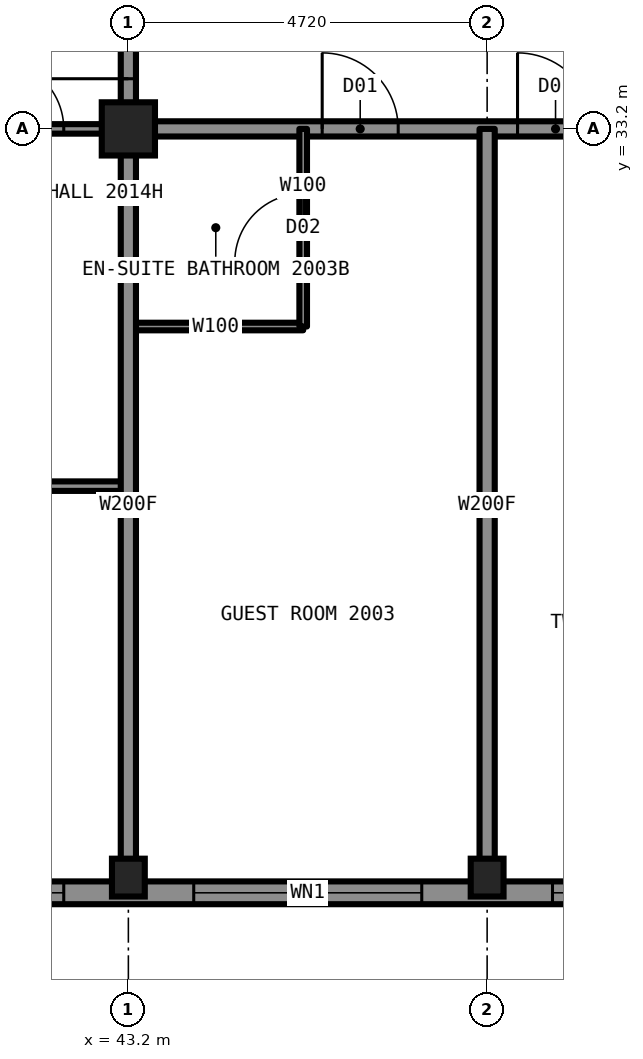
"""IFC4 building model, lengths in metres.
Left out: names, types, materials, properties, quantities, classifications, styles, units other than length and angle.
Written with IfcOpenShell. Run it as: python <this file> out.ifc"""

import sys

from ifc_helpers import new_model, si_unit, direction, frame, frame_2d, origin, origin_2d, place, context, subcontext, project, spatial, rectangle, hollow_rectangle, i_section, extrude, element, fill, save


model = new_model("IFC4")
c1 = context("Model", 3, precision=1e-05, world=origin(), true_north=direction((0.0, 1.0)))
c2 = subcontext(c1, "Body", "Model", "MODEL_VIEW")
j1 = project(units=[si_unit("LENGTHUNIT", "METRE"), si_unit("PLANEANGLEUNIT", "RADIAN")], contexts=[c1])
p1 = place(None, origin())
s1 = spatial("IfcSite", under=j1, at=p1, CompositionType="ELEMENT")
p2 = place(p1, origin())
s2 = spatial("IfcBuilding", under=s1, at=p2, CompositionType="ELEMENT")
p3 = place(p2, frame((0.0, 0.0, 70.5)))
s3 = spatial("IfcBuildingStorey", under=s2, at=p3, CompositionType="ELEMENT", Elevation=70.5)
for number, where, z_axis, x_axis in (
    (1, (43.2, 23.35, 0.0), (0.0, 0.0, 1.0), (1.0, 0.0, 0.0)),
    (2, (47.92, 23.35, 0.0), (0.0, 0.0, 1.0), (1.0, 0.0, 0.0)),
):
    element("IfcColumn", number, at=place(p3, frame(where, z_axis=z_axis, x_axis=x_axis)), inside=s3, PredefinedType="COLUMN", context=c2, shape_type="SweptSolid", body=[
        extrude(i_section(OverallWidth=0.432, OverallDepth=0.498, WebThickness=0.056, FlangeThickness=0.089, at=origin_2d()), origin(), (0.0, 0.0, 1.0), 3.5),
    ])
p4 = place(p3, frame((43.2, 33.2, 0.0), z_axis=(0.0, 0.0, 1.0), x_axis=(1.0, 0.0, 0.0)))
e3 = element("IfcColumn", 3, at=p4, inside=s3, PredefinedType="COLUMN", context=c2, shape_type="SweptSolid", body=[
    extrude(hollow_rectangle(XDim=0.7, YDim=0.7, WallThickness=0.06, at=origin_2d()), origin(), (0.0, 0.0, 1.0), 3.5),
])
p5 = place(p3, frame((43.2, 33.2, 0.0), z_axis=(0.0, 0.0, 1.0), x_axis=(1.0, 0.0, 0.0)))
e4 = element("IfcWall", 4, at=p5, inside=s3, PredefinedType="PARTITIONING", context=c2, shape_type="SweptSolid", body=[
    extrude(rectangle(XDim=23.6, YDim=0.2, at=frame_2d((11.8, 0.0))), origin(), (0.0, 0.0, 1.0), 3.33),
])
p6 = place(p5, frame((2.55, 0.0, 0.0)))
e5 = element("IfcOpeningElement", 5, at=p6, cuts=e4, PredefinedType="OPENING", context=c2, shape_type="SweptSolid", body=[
    extrude(rectangle(XDim=1.0, YDim=2.2, at=frame_2d((0.5, 1.1))), frame((0.0, 0.11, 0.0), z_axis=(0.0, -1.0, 0.0), x_axis=(1.0, 0.0, 0.0)), (0.0, 0.0, 1.0), 0.22),
])
p7 = place(p5, frame((5.12, 0.0, 0.0)))
e6 = element("IfcOpeningElement", 6, at=p7, cuts=e4, PredefinedType="OPENING", context=c2, shape_type="SweptSolid", body=[
    extrude(rectangle(XDim=1.0, YDim=2.2, at=frame_2d((0.5, 1.1))), frame((0.0, 0.11, 0.0), z_axis=(0.0, -1.0, 0.0), x_axis=(1.0, 0.0, 0.0)), (0.0, 0.0, 1.0), 0.22),
])
p8 = place(p5, frame((11.7, 0.0, 0.0)))
e7 = element("IfcOpeningElement", 7, at=p8, cuts=e4, PredefinedType="OPENING", context=c2, shape_type="SweptSolid", body=[
    extrude(rectangle(XDim=1.0, YDim=2.2, at=frame_2d((0.5, 1.1))), frame((0.0, 0.11, 0.0), z_axis=(0.0, -1.0, 0.0), x_axis=(1.0, 0.0, 0.0)), (0.0, 0.0, 1.0), 0.22),
])
p9 = place(p5, frame((16.42, 0.0, 0.0)))
e8 = element("IfcOpeningElement", 8, at=p9, cuts=e4, PredefinedType="OPENING", context=c2, shape_type="SweptSolid", body=[
    extrude(rectangle(XDim=1.0, YDim=2.2, at=frame_2d((0.5, 1.1))), frame((0.0, 0.11, 0.0), z_axis=(0.0, -1.0, 0.0), x_axis=(1.0, 0.0, 0.0)), (0.0, 0.0, 1.0), 0.22),
])
p10 = place(p5, frame((21.43, 0.0, 0.0)))
e9 = element("IfcOpeningElement", 9, at=p10, cuts=e4, PredefinedType="OPENING", context=c2, shape_type="SweptSolid", body=[
    extrude(rectangle(XDim=1.0, YDim=2.2, at=frame_2d((0.5, 1.1))), frame((0.0, 0.11, 0.0), z_axis=(0.0, -1.0, 0.0), x_axis=(1.0, 0.0, 0.0)), (0.0, 0.0, 1.0), 0.22),
])
p11 = place(p3, frame((33.3, 33.2, 0.0), z_axis=(0.0, 0.0, 1.0), x_axis=(1.0, 0.0, 0.0)))
e10 = element("IfcWall", 10, at=p11, inside=s3, PredefinedType="PARTITIONING", context=c2, shape_type="SweptSolid", body=[
    extrude(rectangle(XDim=9.9, YDim=0.125, at=frame_2d((4.95, 0.0))), origin(), (0.0, 0.0, 1.0), 2.573),
])
p12 = place(p11, frame((8.15, 0.0, 0.0)))
e11 = element("IfcOpeningElement", 11, at=p12, cuts=e10, PredefinedType="OPENING", context=c2, shape_type="SweptSolid", body=[
    extrude(rectangle(XDim=0.9, YDim=2.2, at=frame_2d((0.45, 1.1))), frame((0.0, 0.073, 0.0), z_axis=(0.0, -1.0, 0.0), x_axis=(1.0, 0.0, 0.0)), (0.0, 0.0, 1.0), 0.145),
])
p13 = place(p3, frame((43.2, 30.6, 0.0), z_axis=(0.0, 0.0, 1.0), x_axis=(1.0, 0.0, 0.0)))
e12 = element("IfcWall", 12, at=p13, inside=s3, PredefinedType="PARTITIONING", context=c2, shape_type="SweptSolid", body=[
    extrude(rectangle(XDim=2.3, YDim=0.1, at=frame_2d((1.15, 0.0))), origin(), (0.0, 0.0, 1.0), 3.33),
])
p14 = place(p3, frame((33.306, 28.5, 0.0), z_axis=(0.0, 0.0, 1.0), x_axis=(1.0, 0.0, 0.0)))
e13 = element("IfcWall", 13, at=p14, inside=s3, PredefinedType="PARTITIONING", context=c2, shape_type="SweptSolid", body=[
    extrude(rectangle(XDim=9.894, YDim=0.125, at=frame_2d((4.947, 0.0))), origin(), (0.0, 0.0, 1.0), 3.33),
])
p15 = place(p14, frame((7.244, 0.0, 0.0)))
e14 = element("IfcOpeningElement", 14, at=p15, cuts=e13, PredefinedType="OPENING", context=c2, shape_type="SweptSolid", body=[
    extrude(rectangle(XDim=0.9, YDim=2.2, at=frame_2d((0.45, 1.1))), frame((0.0, 0.073, 0.0), z_axis=(0.0, -1.0, 0.0), x_axis=(1.0, 0.0, 0.0)), (0.0, 0.0, 1.0), 0.145),
])
p16 = place(p3, frame((43.2, 33.2, 0.0), z_axis=(0.0, 0.0, 1.0), x_axis=(0.0, 1.0, 0.0)))
e15 = element("IfcWall", 15, at=p16, inside=s3, PredefinedType="PARTITIONING", context=c2, shape_type="SweptSolid", body=[
    extrude(rectangle(XDim=23.6, YDim=0.2, at=frame_2d((11.8, 0.0))), origin(), (0.0, 0.0, 1.0), 3.33),
])
p17 = place(p16, frame((7.87, 0.0, 0.0)))
e16 = element("IfcOpeningElement", 16, at=p17, cuts=e15, PredefinedType="OPENING", context=c2, shape_type="SweptSolid", body=[
    extrude(rectangle(XDim=1.0, YDim=2.2, at=frame_2d((0.5, 1.1))), frame((0.0, 0.11, 0.0), z_axis=(0.0, -1.0, 0.0), x_axis=(1.0, 0.0, 0.0)), (0.0, 0.0, 1.0), 0.22),
])
p18 = place(p16, frame((12.44, 0.0, 0.0)))
e17 = element("IfcOpeningElement", 17, at=p18, cuts=e15, PredefinedType="OPENING", context=c2, shape_type="SweptSolid", body=[
    extrude(rectangle(XDim=1.0, YDim=2.2, at=frame_2d((0.5, 1.1))), frame((0.0, 0.11, 0.0), z_axis=(0.0, -1.0, 0.0), x_axis=(1.0, 0.0, 0.0)), (0.0, 0.0, 1.0), 0.22),
])
p19 = place(p16, frame((21.85, 0.0, 0.0)))
e18 = element("IfcOpeningElement", 18, at=p19, cuts=e15, PredefinedType="OPENING", context=c2, shape_type="SweptSolid", body=[
    extrude(rectangle(XDim=1.1, YDim=2.2, at=frame_2d((0.55, 1.1))), frame((0.0, 0.11, 0.0), z_axis=(0.0, -1.0, 0.0), x_axis=(1.0, 0.0, 0.0)), (0.0, 0.0, 1.0), 0.22),
])
p20 = place(p16, frame((0.66, 0.0, 0.0)))
e19 = element("IfcOpeningElement", 19, at=p20, cuts=e15, PredefinedType="OPENING", context=c2, shape_type="SweptSolid", body=[
    extrude(rectangle(XDim=1.1, YDim=2.2, at=frame_2d((0.55, 1.1))), frame((0.0, 0.11, 0.0), z_axis=(0.0, -1.0, 0.0), x_axis=(1.0, 0.0, 0.0)), (0.0, 0.0, 1.0), 0.22),
])
for number, where, z_axis, x_axis in (
    (20, (43.2, 23.3, 0.0), (0.0, 0.0, 1.0), (0.0, 1.0, 0.0)),
    (21, (47.92, 23.3, 0.0), (0.0, 0.0, 1.0), (0.0, 1.0, 0.0)),
):
    element("IfcWall", number, at=place(p3, frame(where, z_axis=z_axis, x_axis=x_axis)), inside=s3, PredefinedType="PARTITIONING", context=c2, shape_type="SweptSolid", body=[
        extrude(rectangle(XDim=9.9, YDim=0.2, at=frame_2d((4.95, 0.0))), origin(), (0.0, 0.0, 1.0), 2.573),
    ])
p21 = place(p3, frame((45.5, 30.6, 0.0), z_axis=(0.0, 0.0, 1.0), x_axis=(0.0, 1.0, 0.0)))
e22 = element("IfcWall", 22, at=p21, inside=s3, PredefinedType="PARTITIONING", context=c2, shape_type="SweptSolid", body=[
    extrude(rectangle(XDim=2.6, YDim=0.1, at=frame_2d((1.3, 0.0))), origin(), (0.0, 0.0, 1.0), 3.33),
])
p22 = place(p21, frame((0.85, 0.0, 0.0)))
e23 = element("IfcOpeningElement", 23, at=p22, cuts=e22, PredefinedType="OPENING", context=c2, shape_type="SweptSolid", body=[
    extrude(rectangle(XDim=0.9, YDim=2.1, at=frame_2d((0.45, 1.05))), frame((0.0, 0.06, 0.0), z_axis=(0.0, -1.0, 0.0), x_axis=(1.0, 0.0, 0.0)), (0.0, 0.0, 1.0), 0.12),
])
p23 = place(p3, frame((38.5, 23.15, 0.0), z_axis=(0.0, 0.0, 1.0), x_axis=(1.0, 0.0, 0.0)))
e24 = element("IfcWall", 24, at=p23, inside=s3, PredefinedType="SOLIDWALL", context=c2, shape_type="SweptSolid", body=[
    extrude(rectangle(XDim=33.0, YDim=0.3, at=frame_2d((16.5, 0.0))), origin(), (0.0, 0.0, 1.0), 2.83),
])
p24 = place(p23, frame((0.85, 0.0, 0.5)))
e25 = element("IfcOpeningElement", 25, at=p24, cuts=e24, PredefinedType="OPENING", context=c2, shape_type="SweptSolid", body=[
    extrude(rectangle(XDim=2.9, YDim=2.0, at=frame_2d((1.45, 1.0))), frame((0.0, 0.16, 0.0), z_axis=(0.0, -1.0, 0.0), x_axis=(1.0, 0.0, 0.0)), (0.0, 0.0, 1.0), 0.32),
])
p25 = place(p23, frame((6.96, 0.0, 0.55)))
e26 = element("IfcOpeningElement", 26, at=p25, cuts=e24, PredefinedType="OPENING", context=c2, shape_type="SweptSolid", body=[
    extrude(rectangle(XDim=1.6, YDim=1.9, at=frame_2d((0.8, 0.95))), frame((0.0, 0.16, 0.0), z_axis=(0.0, -1.0, 0.0), x_axis=(1.0, 0.0, 0.0)), (0.0, 0.0, 1.0), 0.32),
])
p26 = place(p23, frame((10.28, 0.0, 0.5)))
e27 = element("IfcOpeningElement", 27, at=p26, cuts=e24, PredefinedType="OPENING", context=c2, shape_type="SweptSolid", body=[
    extrude(rectangle(XDim=3.0, YDim=2.0, at=frame_2d((1.5, 1.0))), frame((0.0, 0.16, 0.0), z_axis=(0.0, -1.0, 0.0), x_axis=(1.0, 0.0, 0.0)), (0.0, 0.0, 1.0), 0.32),
])
p27 = place(p23, frame((15.0, 0.0, 0.5)))
e28 = element("IfcOpeningElement", 28, at=p27, cuts=e24, PredefinedType="OPENING", context=c2, shape_type="SweptSolid", body=[
    extrude(rectangle(XDim=3.0, YDim=2.0, at=frame_2d((1.5, 1.0))), frame((0.0, 0.16, 0.0), z_axis=(0.0, -1.0, 0.0), x_axis=(1.0, 0.0, 0.0)), (0.0, 0.0, 1.0), 0.32),
])
p28 = place(p23, frame((19.72, 0.0, 0.5)))
e29 = element("IfcOpeningElement", 29, at=p28, cuts=e24, PredefinedType="OPENING", context=c2, shape_type="SweptSolid", body=[
    extrude(rectangle(XDim=3.0, YDim=2.0, at=frame_2d((1.5, 1.0))), frame((0.0, 0.16, 0.0), z_axis=(0.0, -1.0, 0.0), x_axis=(1.0, 0.0, 0.0)), (0.0, 0.0, 1.0), 0.32),
])
p29 = place(p23, frame((24.44, 0.0, 0.55)))
e30 = element("IfcOpeningElement", 30, at=p29, cuts=e24, PredefinedType="OPENING", context=c2, shape_type="SweptSolid", body=[
    extrude(rectangle(XDim=1.6, YDim=1.9, at=frame_2d((0.8, 0.95))), frame((0.0, 0.16, 0.0), z_axis=(0.0, -1.0, 0.0), x_axis=(1.0, 0.0, 0.0)), (0.0, 0.0, 1.0), 0.32),
])
p30 = place(p23, frame((29.25, 0.0, 0.5)))
e31 = element("IfcOpeningElement", 31, at=p30, cuts=e24, PredefinedType="OPENING", context=c2, shape_type="SweptSolid", body=[
    extrude(rectangle(XDim=2.9, YDim=2.0, at=frame_2d((1.45, 1.0))), frame((0.0, 0.16, 0.0), z_axis=(0.0, -1.0, 0.0), x_axis=(1.0, 0.0, 0.0)), (0.0, 0.0, 1.0), 0.32),
])
p31 = place(p23, frame((6.31, 0.0, 1.45)))
e32 = element("IfcOpeningElement", 32, at=p31, cuts=e24, PredefinedType="OPENING", context=c2, shape_type="SweptSolid", body=[
    extrude(rectangle(XDim=0.6, YDim=1.0, at=frame_2d((0.3, 0.5))), frame((0.0, 0.16, 0.0), z_axis=(0.0, -1.0, 0.0), x_axis=(1.0, 0.0, 0.0)), (0.0, 0.0, 1.0), 0.32),
])
p32 = place(p23, frame((26.04, 0.0, 1.45)))
e33 = element("IfcOpeningElement", 33, at=p32, cuts=e24, PredefinedType="OPENING", context=c2, shape_type="SweptSolid", body=[
    extrude(rectangle(XDim=0.6, YDim=1.0, at=frame_2d((0.3, 0.5))), frame((0.0, 0.16, 0.0), z_axis=(0.0, -1.0, 0.0), x_axis=(1.0, 0.0, 0.0)), (0.0, 0.0, 1.0), 0.32),
])
p33 = place(p6, origin())
e34 = element("IfcDoor", 34, at=p33, inside=s3, OperationType="SINGLE_SWING_LEFT", PredefinedType="DOOR", context=c2, shape_type="SweptSolid", body=[
    extrude(rectangle(XDim=1.0, YDim=2.2, at=frame_2d((0.5, 1.1))), frame((0.0, 0.025, 0.0), z_axis=(0.0, -1.0, 0.0), x_axis=(1.0, 0.0, 0.0)), (0.0, 0.0, 1.0), 0.05),
])
fill(e5, e34)
p34 = place(p22, origin())
e35 = element("IfcDoor", 35, at=p34, inside=s3, OperationType="SINGLE_SWING_RIGHT", PredefinedType="DOOR", context=c2, shape_type="SweptSolid", body=[
    extrude(rectangle(XDim=0.9, YDim=2.1, at=frame_2d((0.45, 1.05))), frame((0.0, 0.025, 0.0), z_axis=(0.0, -1.0, 0.0), x_axis=(1.0, 0.0, 0.0)), (0.0, 0.0, 1.0), 0.05),
])
fill(e23, e35)
p35 = place(p7, origin())
e36 = element("IfcDoor", 36, at=p35, inside=s3, OperationType="SINGLE_SWING_LEFT", PredefinedType="DOOR", context=c2, shape_type="SweptSolid", body=[
    extrude(rectangle(XDim=1.0, YDim=2.2, at=frame_2d((0.5, 1.1))), frame((0.0, 0.025, 0.0), z_axis=(0.0, -1.0, 0.0), x_axis=(1.0, 0.0, 0.0)), (0.0, 0.0, 1.0), 0.05),
])
fill(e6, e36)
p36 = place(p12, origin())
e37 = element("IfcDoor", 37, at=p36, inside=s3, OperationType="SINGLE_SWING_LEFT", PredefinedType="DOOR", context=c2, shape_type="SweptSolid", body=[
    extrude(rectangle(XDim=0.9, YDim=2.2, at=frame_2d((0.45, 1.1))), frame((0.0, 0.025, 0.0), z_axis=(0.0, -1.0, 0.0), x_axis=(1.0, 0.0, 0.0)), (0.0, 0.0, 1.0), 0.05),
])
fill(e11, e37)
p37 = place(p20, origin())
e38 = element("IfcDoor", 38, at=p37, inside=s3, OperationType="SINGLE_SWING_LEFT", PredefinedType="DOOR", context=c2, shape_type="SweptSolid", body=[
    extrude(rectangle(XDim=1.1, YDim=2.2, at=frame_2d((0.55, 1.1))), frame((0.0, 0.025, 0.0), z_axis=(0.0, -1.0, 0.0), x_axis=(1.0, 0.0, 0.0)), (0.0, 0.0, 1.0), 0.05),
])
fill(e19, e38)
p38 = place(p24, origin())
e39 = element("IfcWindow", 39, at=p38, inside=s3, PartitioningType="SINGLE_PANEL", PredefinedType="WINDOW", context=c2, shape_type="SweptSolid", body=[
    extrude(rectangle(XDim=2.9, YDim=2.0, at=frame_2d((1.45, 1.0))), frame((0.0, 0.03, 0.0), z_axis=(0.0, -1.0, 0.0), x_axis=(1.0, 0.0, 0.0)), (0.0, 0.0, 1.0), 0.06),
])
fill(e25, e39)
p39 = place(p25, origin())
e40 = element("IfcWindow", 40, at=p39, inside=s3, PartitioningType="SINGLE_PANEL", PredefinedType="WINDOW", context=c2, shape_type="SweptSolid", body=[
    extrude(rectangle(XDim=1.6, YDim=1.9, at=frame_2d((0.8, 0.95))), frame((0.0, 0.03, 0.0), z_axis=(0.0, -1.0, 0.0), x_axis=(1.0, 0.0, 0.0)), (0.0, 0.0, 1.0), 0.06),
])
fill(e26, e40)
p40 = place(p26, origin())
e41 = element("IfcWindow", 41, at=p40, inside=s3, PartitioningType="SINGLE_PANEL", PredefinedType="WINDOW", context=c2, shape_type="SweptSolid", body=[
    extrude(rectangle(XDim=3.0, YDim=2.0, at=frame_2d((1.5, 1.0))), frame((0.0, 0.03, 0.0), z_axis=(0.0, -1.0, 0.0), x_axis=(1.0, 0.0, 0.0)), (0.0, 0.0, 1.0), 0.06),
])
fill(e27, e41)
p41 = place(p31, origin())
e42 = element("IfcWindow", 42, at=p41, inside=s3, PartitioningType="SINGLE_PANEL", PredefinedType="WINDOW", context=c2, shape_type="SweptSolid", body=[
    extrude(rectangle(XDim=0.6, YDim=1.0, at=frame_2d((0.3, 0.5))), frame((0.0, 0.03, 0.0), z_axis=(0.0, -1.0, 0.0), x_axis=(1.0, 0.0, 0.0)), (0.0, 0.0, 1.0), 0.06),
])
fill(e32, e42)
save(model, sys.argv[1])
